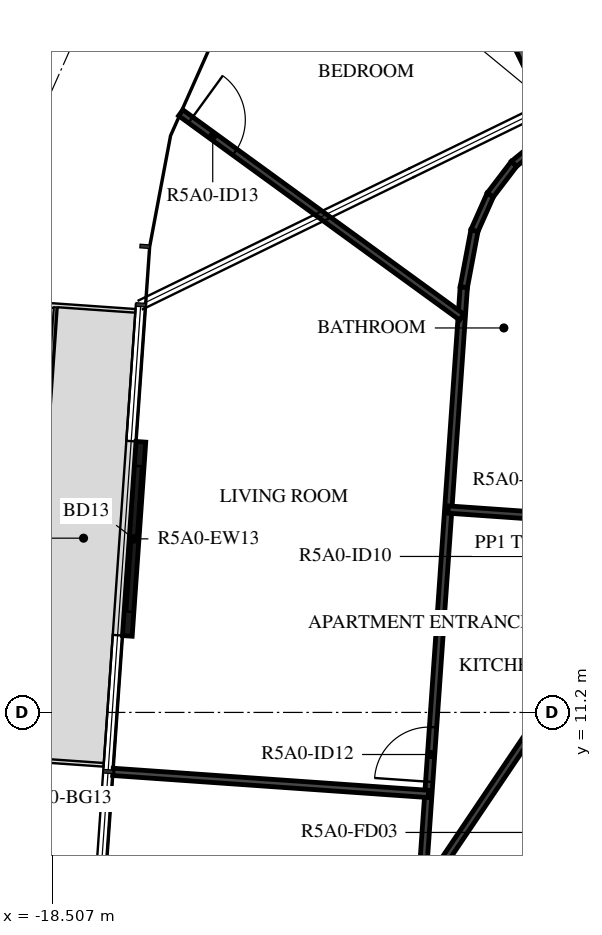
"""IFC4 building model, lengths in metres.
Left out: names, types, materials, properties, quantities, classifications, styles, units other than length and angle.
Written with IfcOpenShell. Run it as: python <this file> out.ifc"""

import sys

from ifc_helpers import new_model, si_unit, direction, frame, frame_2d, origin, place, context, subcontext, project, spatial, rectangle, extrude, element, fill, save


model = new_model("IFC4")
c1 = context("Model", 3, precision=1e-05, world=origin(), true_north=direction((0.0, 1.0)))
c2 = subcontext(c1, "Body", "Model", "MODEL_VIEW")
j1 = project(units=[si_unit("LENGTHUNIT", "METRE"), si_unit("PLANEANGLEUNIT", "RADIAN")], contexts=[c1])
p1 = place(None, origin())
s1 = spatial("IfcSite", under=j1, at=p1, CompositionType="ELEMENT")
p2 = place(p1, origin())
s2 = spatial("IfcBuilding", under=s1, at=p2, CompositionType="ELEMENT")
p3 = place(p2, frame((0.0, 0.0, 195.4)))
s3 = spatial("IfcBuildingStorey", under=s2, at=p3, CompositionType="ELEMENT", Elevation=195.4)
p4 = place(p3, frame((-17.051, 15.65, 0.0), z_axis=(0.0, 0.0, 1.0), x_axis=(-0.069734222855, -0.997565605944, 0.0)))
e1 = element("IfcWall", 1, at=p4, inside=s3, PredefinedType="STANDARD", context=c2, shape_type="SweptSolid", body=[
    extrude(rectangle(XDim=3.2, YDim=0.16, at=frame_2d((1.6, 0.0))), origin(), (0.0, 0.0, 1.0), 3.12),
])
p5 = place(p4, frame((0.4, 0.0, 0.0)))
e2 = element("IfcOpeningElement", 2, at=p5, cuts=e1, PredefinedType="OPENING", context=c2, shape_type="SweptSolid", body=[
    extrude(rectangle(XDim=2.4, YDim=2.4, at=frame_2d((1.2, 1.2))), frame((0.0, 0.09, 0.0), z_axis=(0.0, -1.0, 0.0), x_axis=(1.0, 0.0, 0.0)), (0.0, 0.0, 1.0), 0.18),
])
p6 = place(p3, frame((-9.101, 10.47, 0.0), z_axis=(0.0, 0.0, 1.0), x_axis=(-0.559195469534, -0.829035841718, 0.0)))
e3 = element("IfcWall", 3, at=p6, inside=s3, PredefinedType="STANDARD", context=c2, shape_type="SweptSolid", body=[
    extrude(rectangle(XDim=7.181, YDim=0.2, at=frame_2d((3.591, 0.0))), origin(), (0.0, 0.0, 1.0), 3.12),
])
p7 = place(p6, frame((1.0, 0.0, 0.0)))
e4 = element("IfcOpeningElement", 4, at=p7, cuts=e3, PredefinedType="OPENING", context=c2, shape_type="SweptSolid", body=[
    extrude(rectangle(XDim=1.0, YDim=2.1, at=frame_2d((0.5, 1.05))), frame((0.0, 0.11, 0.0), z_axis=(0.0, -1.0, 0.0), x_axis=(1.0, 0.0, 0.0)), (0.0, 0.0, 1.0), 0.22),
])
p8 = place(p3, frame((-12.409, 25.442, 0.0), z_axis=(0.0, 0.0, 1.0), x_axis=(0.43838641251, -0.898786600549, 0.0)))
e5 = element("IfcWall", 5, at=p8, inside=s3, PredefinedType="STANDARD", context=c2, shape_type="SweptSolid", body=[
    extrude(rectangle(XDim=6.333, YDim=0.2, at=frame_2d((3.166, 0.0))), origin(), (0.0, 0.0, 1.0), 3.12),
])
p9 = place(p3, frame((-10.12, 11.642, 0.0), z_axis=(0.0, 0.0, 1.0), x_axis=(-0.55920080659, -0.829032241779, 0.0)))
e6 = element("IfcWall", 6, at=p9, inside=s3, PredefinedType="PARTITIONING", context=c2, shape_type="SweptSolid", body=[
    extrude(rectangle(XDim=7.985, YDim=0.12, at=frame_2d((3.992, 0.0))), origin(), (0.0, 0.0, 1.0), 3.12),
])
p10 = place(p9, frame((4.346, 0.0, 0.0)))
e7 = element("IfcOpeningElement", 7, at=p10, cuts=e6, PredefinedType="OPENING", context=c2, shape_type="SweptSolid", body=[
    extrude(rectangle(XDim=0.9, YDim=2.1, at=frame_2d((0.45, 1.05))), frame((0.0, 0.07, 0.0), z_axis=(0.0, -1.0, 0.0), x_axis=(1.0, 0.0, 0.0)), (0.0, 0.0, 1.0), 0.14),
])
p11 = place(p3, frame((-12.439, 8.204, 0.0), z_axis=(0.0, 0.0, 1.0), x_axis=(0.069750037523, 0.997564500303, 0.0)))
e8 = element("IfcWall", 8, at=p11, inside=s3, PredefinedType="PARTITIONING", context=c2, shape_type="SweptSolid", body=[
    extrude(rectangle(XDim=10.014, YDim=0.12, at=frame_2d((5.007, 0.0))), origin(), (0.0, 0.0, 1.0), 3.12),
])
p12 = place(p11, frame((1.859, 0.0, 0.0)))
e9 = element("IfcOpeningElement", 9, at=p12, cuts=e8, PredefinedType="OPENING", context=c2, shape_type="SweptSolid", body=[
    extrude(rectangle(XDim=0.9, YDim=2.1, at=frame_2d((0.45, 1.05))), frame((0.0, 0.07, 0.0), z_axis=(0.0, -1.0, 0.0), x_axis=(1.0, 0.0, 0.0)), (0.0, 0.0, 1.0), 0.14),
])
p13 = place(p3, frame((-11.74, 18.194, 0.0), z_axis=(0.0, 0.0, 1.0), x_axis=(0.185144760846, 0.982711258474, 0.0)))
e10 = element("IfcWall", 10, at=p13, inside=s3, PredefinedType="PARTITIONING", context=c2, shape_type="SweptSolid", body=[
    extrude(rectangle(XDim=0.947, YDim=0.12, at=frame_2d((0.473, 0.0))), origin(), (0.0, 0.0, 1.0), 3.12),
])
for number, where, z_axis, x_axis in (
    (11, (-11.565, 19.125, 0.0), (0.0, 0.0, 1.0), (0.407, 0.914, 0.0)),
    (12, (-11.304, 19.711, 0.0), (0.0, 0.0, 1.0), (0.607, 0.795, 0.0)),
    (13, (-10.915, 20.221, 0.0), (0.0, 0.0, 1.0), (0.773, 0.634, 0.0)),
):
    element("IfcWall", number, at=place(p3, frame(where, z_axis=z_axis, x_axis=x_axis)), inside=s3, PredefinedType="PARTITIONING", context=c2, shape_type="SweptSolid", body=[
        extrude(rectangle(XDim=0.642, YDim=0.12, at=frame_2d((0.321, 0.0))), origin(), (0.0, 0.0, 1.0), 3.12),
    ])
p14 = place(p3, frame((-16.395, 21.061, 0.0), z_axis=(0.0, 0.0, 1.0), x_axis=(0.808810002497, -0.58807004673, 0.0)))
e14 = element("IfcWall", 14, at=p14, inside=s3, PredefinedType="PARTITIONING", context=c2, shape_type="SweptSolid", body=[
    extrude(rectangle(XDim=5.713, YDim=0.12, at=frame_2d((2.856, 0.0))), origin(), (0.0, 0.0, 1.0), 3.12),
])
p15 = place(p14, frame((0.2, 0.0, 0.0)))
e15 = element("IfcOpeningElement", 15, at=p15, cuts=e14, PredefinedType="OPENING", context=c2, shape_type="SweptSolid", body=[
    extrude(rectangle(XDim=0.9, YDim=2.1, at=frame_2d((0.45, 1.05))), frame((0.0, 0.07, 0.0), z_axis=(0.0, -1.0, 0.0), x_axis=(1.0, 0.0, 0.0)), (0.0, 0.0, 1.0), 0.14),
])
p16 = place(p3, frame((-11.996, 14.536, 0.0), z_axis=(0.0, 0.0, 1.0), x_axis=(0.997565991425, -0.069728708231, 0.0)))
e16 = element("IfcWall", 16, at=p16, inside=s3, PredefinedType="PARTITIONING", context=c2, shape_type="SweptSolid", body=[
    extrude(rectangle(XDim=2.686, YDim=0.12, at=frame_2d((1.343, 0.0))), origin(), (0.0, 0.0, 1.0), 3.12),
])
p17 = place(p3, frame((-17.51, 10.222, 0.0), z_axis=(0.0, 0.0, 1.0), x_axis=(0.997563184303, -0.069768856397, 0.0)))
e17 = element("IfcWall", 17, at=p17, inside=s3, PredefinedType="PARTITIONING", context=c2, shape_type="SweptSolid", body=[
    extrude(rectangle(XDim=5.2, YDim=0.12, at=frame_2d((2.6, 0.0))), origin(), (0.0, 0.0, 1.0), 2.73),
])
p18 = place(p5, origin())
e18 = element("IfcDoor", 18, at=p18, inside=s3, OperationType="DOUBLE_DOOR_SLIDING", PredefinedType="DOOR", context=c2, shape_type="SweptSolid", body=[
    extrude(rectangle(XDim=2.4, YDim=2.4, at=frame_2d((1.2, 1.2))), frame((0.0, 0.025, 0.0), z_axis=(0.0, -1.0, 0.0), x_axis=(1.0, 0.0, 0.0)), (0.0, 0.0, 1.0), 0.05),
])
fill(e2, e18)
p19 = place(p12, origin())
e19 = element("IfcDoor", 19, at=p19, inside=s3, OperationType="SINGLE_SWING_LEFT", PredefinedType="DOOR", context=c2, shape_type="SweptSolid", body=[
    extrude(rectangle(XDim=0.9, YDim=2.1, at=frame_2d((0.45, 1.05))), frame((0.0, 0.025, 0.0), z_axis=(0.0, -1.0, 0.0), x_axis=(1.0, 0.0, 0.0)), (0.0, 0.0, 1.0), 0.05),
])
fill(e9, e19)
p20 = place(p15, origin())
e20 = element("IfcDoor", 20, at=p20, inside=s3, OperationType="SINGLE_SWING_LEFT", PredefinedType="DOOR", context=c2, shape_type="SweptSolid", body=[
    extrude(rectangle(XDim=0.9, YDim=2.1, at=frame_2d((0.45, 1.05))), frame((0.0, 0.025, 0.0), z_axis=(0.0, -1.0, 0.0), x_axis=(1.0, 0.0, 0.0)), (0.0, 0.0, 1.0), 0.05),
])
fill(e15, e20)
save(model, sys.argv[1])
